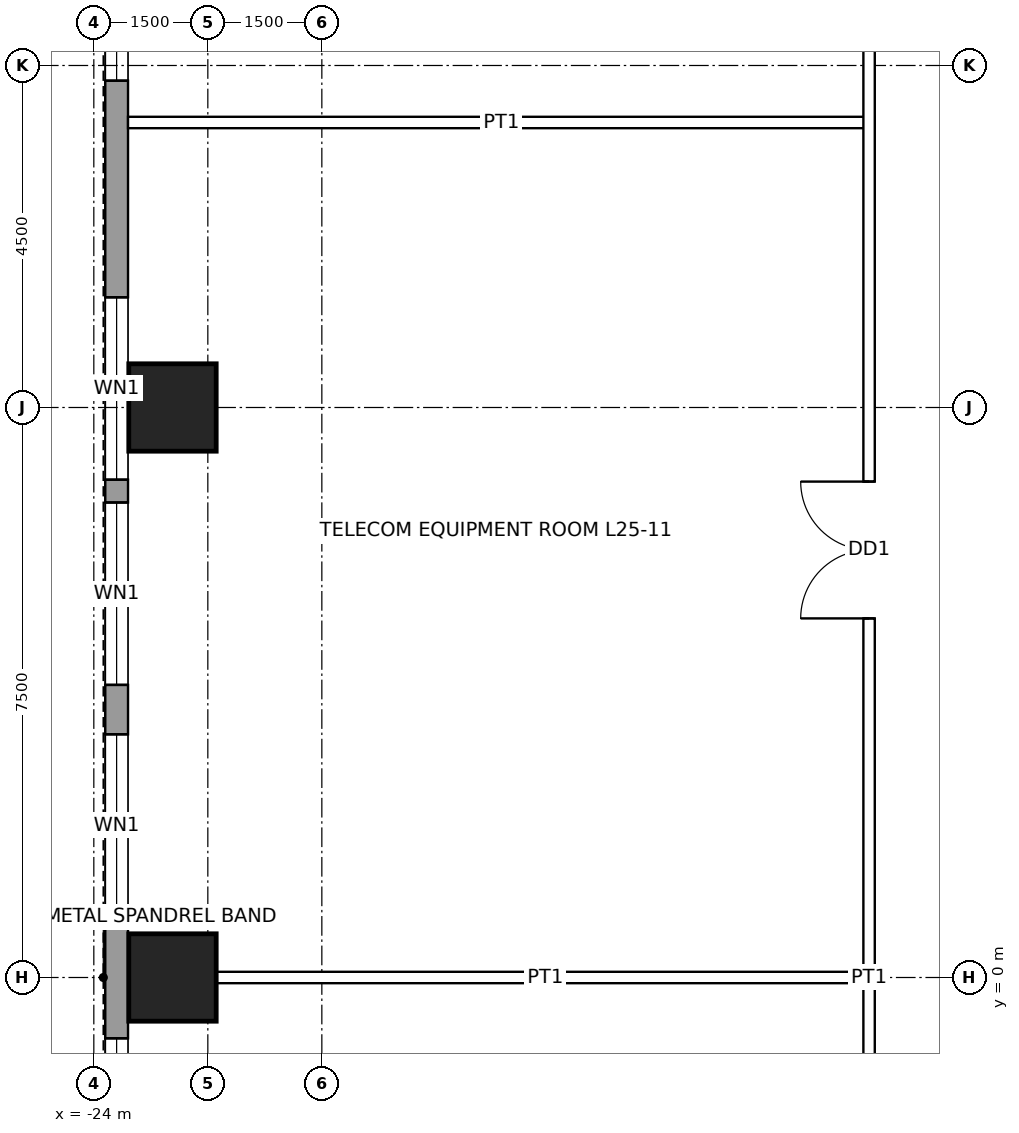
"""IFC4 building model, lengths in metres.
Left out: names, types, materials, properties, quantities, classifications, styles, units other than length and angle.
Written with IfcOpenShell. Run it as: python <this file> out.ifc"""

import sys

from ifc_helpers import new_model, si_unit, direction, frame, frame_2d, origin, origin_2d, place, context, subcontext, project, spatial, rectangle, hollow_rectangle, extrude, element, fill, save


model = new_model("IFC4")
c1 = context("Model", 3, precision=1e-05, world=origin(), true_north=direction((0.0, 1.0)))
c2 = subcontext(c1, "Body", "Model", "MODEL_VIEW")
j1 = project(units=[si_unit("LENGTHUNIT", "METRE"), si_unit("PLANEANGLEUNIT", "RADIAN")], contexts=[c1])
p1 = place(None, origin())
s1 = spatial("IfcSite", under=j1, at=p1, CompositionType="ELEMENT")
p2 = place(p1, origin())
s2 = spatial("IfcBuilding", under=s1, at=p2, CompositionType="ELEMENT")
p3 = place(p2, frame((0.0, 0.0, 126.9)))
s3 = spatial("IfcBuildingStorey", under=s2, at=p3, CompositionType="ELEMENT", Elevation=126.9)
for number, where, z_axis, x_axis in (
    (1, (-22.965, 0.0, 0.0), (0.0, 0.0, 1.0), (1.0, 0.0, 0.0)),
    (2, (-22.965, 7.5, 0.0), (0.0, 0.0, 1.0), (1.0, 0.0, 0.0)),
):
    element("IfcColumn", number, at=place(p3, frame(where, z_axis=z_axis, x_axis=x_axis)), inside=s3, PredefinedType="COLUMN", context=c2, shape_type="SweptSolid", body=[
        extrude(hollow_rectangle(XDim=1.15, YDim=1.15, WallThickness=0.075, at=origin_2d()), origin(), (0.0, 0.0, 1.0), 4.5),
    ])
p4 = place(p3, frame((-23.7, -16.2, 0.0), z_axis=(0.0, 0.0, 1.0), x_axis=(0.0, 1.0, 0.0)))
e3 = element("IfcWall", 3, at=p4, inside=s3, PredefinedType="SOLIDWALL", context=c2, shape_type="SweptSolid", body=[
    extrude(rectangle(XDim=32.4, YDim=0.3, at=frame_2d((16.2, 0.0))), origin(), (0.0, 0.0, 1.0), 4.3),
])
p5 = place(p4, frame((2.0, 0.0, 1.0)))
e4 = element("IfcOpeningElement", 4, at=p5, cuts=e3, PredefinedType="OPENING", context=c2, shape_type="SweptSolid", body=[
    extrude(rectangle(XDim=2.4, YDim=1.2, at=frame_2d((1.2, 0.6))), frame((0.0, 0.16, 0.0), z_axis=(0.0, -1.0, 0.0), x_axis=(1.0, 0.0, 0.0)), (0.0, 0.0, 1.0), 0.32),
])
p6 = place(p4, frame((7.25, 0.0, 1.0)))
e5 = element("IfcOpeningElement", 5, at=p6, cuts=e3, PredefinedType="OPENING", context=c2, shape_type="SweptSolid", body=[
    extrude(rectangle(XDim=2.4, YDim=1.2, at=frame_2d((1.2, 0.6))), frame((0.0, 0.16, 0.0), z_axis=(0.0, -1.0, 0.0), x_axis=(1.0, 0.0, 0.0)), (0.0, 0.0, 1.0), 0.32),
])
p7 = place(p4, frame((9.95, 0.0, 1.0)))
e6 = element("IfcOpeningElement", 6, at=p7, cuts=e3, PredefinedType="OPENING", context=c2, shape_type="SweptSolid", body=[
    extrude(rectangle(XDim=2.4, YDim=1.2, at=frame_2d((1.2, 0.6))), frame((0.0, 0.16, 0.0), z_axis=(0.0, -1.0, 0.0), x_axis=(1.0, 0.0, 0.0)), (0.0, 0.0, 1.0), 0.32),
])
p8 = place(p4, frame((13.0, 0.0, 1.0)))
e7 = element("IfcOpeningElement", 7, at=p8, cuts=e3, PredefinedType="OPENING", context=c2, shape_type="SweptSolid", body=[
    extrude(rectangle(XDim=2.4, YDim=1.2, at=frame_2d((1.2, 0.6))), frame((0.0, 0.16, 0.0), z_axis=(0.0, -1.0, 0.0), x_axis=(1.0, 0.0, 0.0)), (0.0, 0.0, 1.0), 0.32),
])
p9 = place(p4, frame((17.0, 0.0, 1.0)))
e8 = element("IfcOpeningElement", 8, at=p9, cuts=e3, PredefinedType="OPENING", context=c2, shape_type="SweptSolid", body=[
    extrude(rectangle(XDim=2.4, YDim=1.2, at=frame_2d((1.2, 0.6))), frame((0.0, 0.16, 0.0), z_axis=(0.0, -1.0, 0.0), x_axis=(1.0, 0.0, 0.0)), (0.0, 0.0, 1.0), 0.32),
])
p10 = place(p4, frame((20.05, 0.0, 1.0)))
e9 = element("IfcOpeningElement", 9, at=p10, cuts=e3, PredefinedType="OPENING", context=c2, shape_type="SweptSolid", body=[
    extrude(rectangle(XDim=2.4, YDim=1.2, at=frame_2d((1.2, 0.6))), frame((0.0, 0.16, 0.0), z_axis=(0.0, -1.0, 0.0), x_axis=(1.0, 0.0, 0.0)), (0.0, 0.0, 1.0), 0.32),
])
p11 = place(p4, frame((22.75, 0.0, 1.0)))
e10 = element("IfcOpeningElement", 10, at=p11, cuts=e3, PredefinedType="OPENING", context=c2, shape_type="SweptSolid", body=[
    extrude(rectangle(XDim=2.4, YDim=1.2, at=frame_2d((1.2, 0.6))), frame((0.0, 0.16, 0.0), z_axis=(0.0, -1.0, 0.0), x_axis=(1.0, 0.0, 0.0)), (0.0, 0.0, 1.0), 0.32),
])
p12 = place(p4, frame((28.0, 0.0, 1.0)))
e11 = element("IfcOpeningElement", 11, at=p12, cuts=e3, PredefinedType="OPENING", context=c2, shape_type="SweptSolid", body=[
    extrude(rectangle(XDim=2.4, YDim=1.2, at=frame_2d((1.2, 0.6))), frame((0.0, 0.16, 0.0), z_axis=(0.0, -1.0, 0.0), x_axis=(1.0, 0.0, 0.0)), (0.0, 0.0, 1.0), 0.32),
])
p13 = place(p3, frame((-22.39, 0.0, 0.0), z_axis=(0.0, 0.0, 1.0), x_axis=(1.0, 0.0, 0.0)))
e12 = element("IfcWall", 12, at=p13, inside=s3, PredefinedType="PARTITIONING", context=c2, shape_type="SweptSolid", body=[
    extrude(rectangle(XDim=8.665, YDim=0.15, at=frame_2d((4.333, 0.0))), origin(), (0.0, 0.0, 1.0), 3.431),
])
p14 = place(p3, frame((-23.55, 11.25, 0.0), z_axis=(0.0, 0.0, 1.0), x_axis=(1.0, 0.0, 0.0)))
e13 = element("IfcWall", 13, at=p14, inside=s3, PredefinedType="PARTITIONING", context=c2, shape_type="SweptSolid", body=[
    extrude(rectangle(XDim=9.825, YDim=0.15, at=frame_2d((4.913, 0.0))), origin(), (0.0, 0.0, 1.0), 3.431),
])
p15 = place(p3, frame((-13.8, -13.875, 0.0), z_axis=(0.0, 0.0, 1.0), x_axis=(0.0, 1.0, 0.0)))
e14 = element("IfcWall", 14, at=p15, inside=s3, PredefinedType="PARTITIONING", context=c2, shape_type="SweptSolid", body=[
    extrude(rectangle(XDim=27.75, YDim=0.15, at=frame_2d((13.875, 0.0))), origin(), (0.0, 0.0, 1.0), 4.3),
])
p16 = place(p15, frame((7.75, 0.0, 0.0)))
e15 = element("IfcOpeningElement", 15, at=p16, cuts=e14, PredefinedType="OPENING", context=c2, shape_type="SweptSolid", body=[
    extrude(rectangle(XDim=1.0, YDim=2.1, at=frame_2d((0.5, 1.05))), frame((0.0, 0.085, 0.0), z_axis=(0.0, -1.0, 0.0), x_axis=(1.0, 0.0, 0.0)), (0.0, 0.0, 1.0), 0.17),
])
p17 = place(p15, frame((18.6, 0.0, 0.0)))
e16 = element("IfcOpeningElement", 16, at=p17, cuts=e14, PredefinedType="OPENING", context=c2, shape_type="SweptSolid", body=[
    extrude(rectangle(XDim=1.8, YDim=2.4, at=frame_2d((0.9, 1.2))), frame((0.0, 0.085, 0.0), z_axis=(0.0, -1.0, 0.0), x_axis=(1.0, 0.0, 0.0)), (0.0, 0.0, 1.0), 0.17),
])
p18 = place(p8, origin())
e17 = element("IfcWindow", 17, at=p18, inside=s3, PartitioningType="SINGLE_PANEL", PredefinedType="WINDOW", context=c2, shape_type="SweptSolid", body=[
    extrude(rectangle(XDim=2.4, YDim=1.2, at=frame_2d((1.2, 0.6))), frame((0.0, 0.03, 0.0), z_axis=(0.0, -1.0, 0.0), x_axis=(1.0, 0.0, 0.0)), (0.0, 0.0, 1.0), 0.06),
])
fill(e7, e17)
p19 = place(p9, origin())
e18 = element("IfcWindow", 18, at=p19, inside=s3, PartitioningType="SINGLE_PANEL", PredefinedType="WINDOW", context=c2, shape_type="SweptSolid", body=[
    extrude(rectangle(XDim=2.4, YDim=1.2, at=frame_2d((1.2, 0.6))), frame((0.0, 0.03, 0.0), z_axis=(0.0, -1.0, 0.0), x_axis=(1.0, 0.0, 0.0)), (0.0, 0.0, 1.0), 0.06),
])
fill(e8, e18)
p20 = place(p10, origin())
e19 = element("IfcWindow", 19, at=p20, inside=s3, PartitioningType="SINGLE_PANEL", PredefinedType="WINDOW", context=c2, shape_type="SweptSolid", body=[
    extrude(rectangle(XDim=2.4, YDim=1.2, at=frame_2d((1.2, 0.6))), frame((0.0, 0.03, 0.0), z_axis=(0.0, -1.0, 0.0), x_axis=(1.0, 0.0, 0.0)), (0.0, 0.0, 1.0), 0.06),
])
fill(e9, e19)
p21 = place(p11, origin())
e20 = element("IfcWindow", 20, at=p21, inside=s3, PartitioningType="SINGLE_PANEL", PredefinedType="WINDOW", context=c2, shape_type="SweptSolid", body=[
    extrude(rectangle(XDim=2.4, YDim=1.2, at=frame_2d((1.2, 0.6))), frame((0.0, 0.03, 0.0), z_axis=(0.0, -1.0, 0.0), x_axis=(1.0, 0.0, 0.0)), (0.0, 0.0, 1.0), 0.06),
])
fill(e10, e20)
p22 = place(p12, origin())
e21 = element("IfcWindow", 21, at=p22, inside=s3, PartitioningType="SINGLE_PANEL", PredefinedType="WINDOW", context=c2, shape_type="SweptSolid", body=[
    extrude(rectangle(XDim=2.4, YDim=1.2, at=frame_2d((1.2, 0.6))), frame((0.0, 0.03, 0.0), z_axis=(0.0, -1.0, 0.0), x_axis=(1.0, 0.0, 0.0)), (0.0, 0.0, 1.0), 0.06),
])
fill(e11, e21)
p23 = place(p17, origin())
e22 = element("IfcDoor", 22, at=p23, inside=s3, OperationType="DOUBLE_DOOR_SINGLE_SWING", PredefinedType="DOOR", context=c2, shape_type="SweptSolid", body=[
    extrude(rectangle(XDim=1.8, YDim=2.4, at=frame_2d((0.9, 1.2))), frame((0.0, 0.025, 0.0), z_axis=(0.0, -1.0, 0.0), x_axis=(1.0, 0.0, 0.0)), (0.0, 0.0, 1.0), 0.05),
])
fill(e16, e22)
save(model, sys.argv[1])
